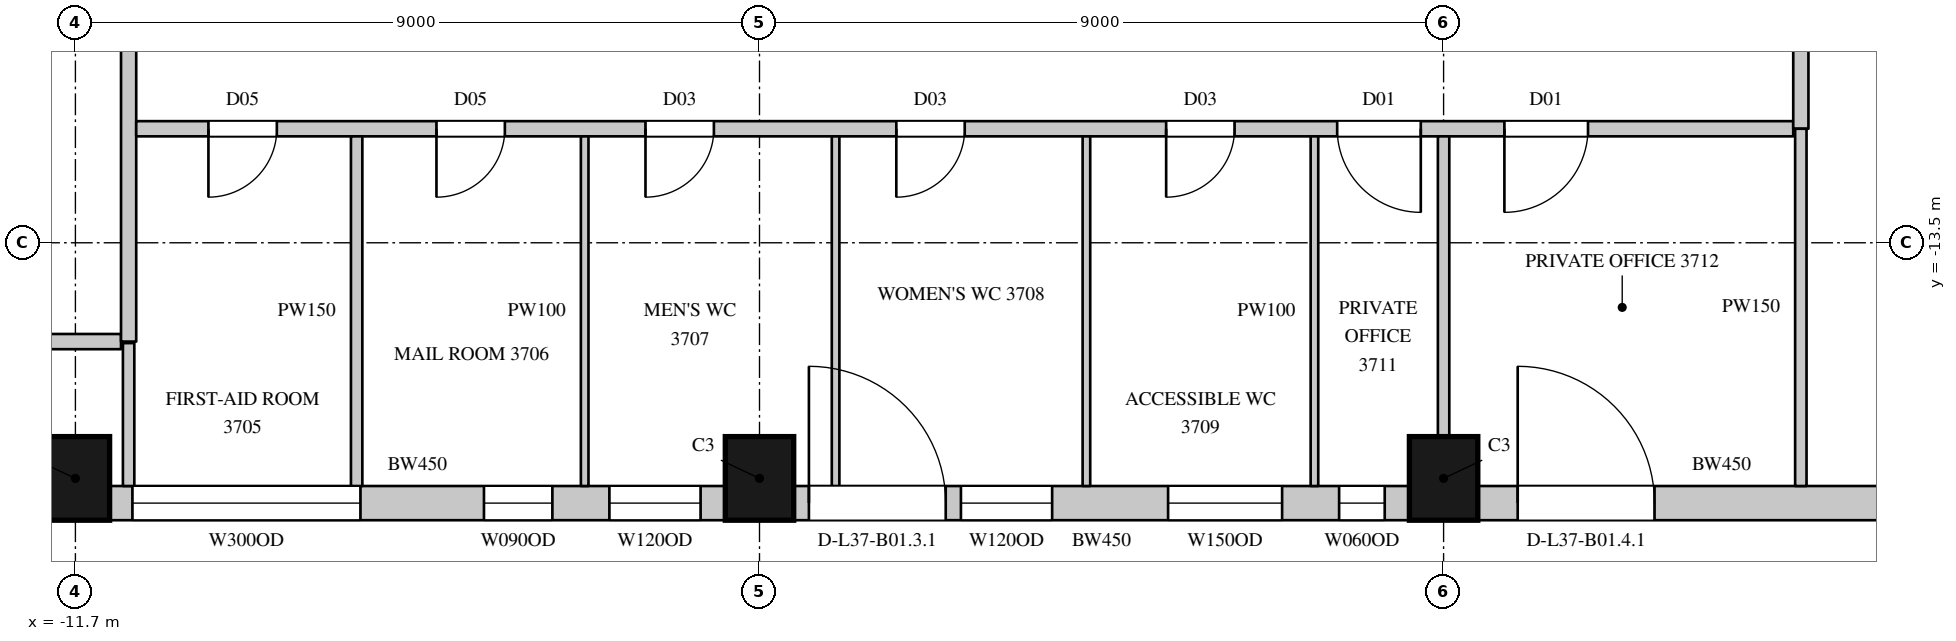
"""IFC4 building model, lengths in metres.
Left out: names, types, materials, properties, quantities, classifications, styles, units other than length and angle.
Written with IfcOpenShell. Run it as: python <this file> out.ifc"""

import sys

from ifc_helpers import new_model, si_unit, direction, frame, frame_2d, origin, origin_2d, place, context, subcontext, project, spatial, rectangle, extrude, element, fill, save


model = new_model("IFC4")
c1 = context("Model", 3, precision=1e-05, world=origin(), true_north=direction((0.0, 1.0)))
c2 = subcontext(c1, "Body", "Model", "MODEL_VIEW")
j1 = project(units=[si_unit("LENGTHUNIT", "METRE"), si_unit("PLANEANGLEUNIT", "RADIAN")], contexts=[c1])
p1 = place(None, origin())
s1 = spatial("IfcSite", under=j1, at=p1, CompositionType="ELEMENT")
p2 = place(p1, origin())
s2 = spatial("IfcBuilding", under=s1, at=p2, CompositionType="ELEMENT")
p3 = place(p2, frame((0.0, 0.0, 172.8)))
s3 = spatial("IfcBuildingStorey", under=s2, at=p3, CompositionType="ELEMENT", Elevation=172.8)
for number, where, z_axis, x_axis in (
    (1, (-11.7, -16.6, 0.0), (0.0, 0.0, 1.0), (1.0, 0.0, 0.0)),
    (2, (-2.7, -16.6, 0.0), (0.0, 0.0, 1.0), (1.0, 0.0, 0.0)),
    (3, (6.3, -16.6, 0.0), (0.0, 0.0, 1.0), (1.0, 0.0, 0.0)),
):
    element("IfcColumn", number, at=place(p3, frame(where, z_axis=z_axis, x_axis=x_axis)), inside=s3, PredefinedType="COLUMN", context=c2, shape_type="SweptSolid", body=[
        extrude(rectangle(XDim=0.9, YDim=1.1, at=origin_2d()), origin(), (0.0, 0.0, 1.0), 4.1),
    ])
p4 = place(p3, frame((-11.25, -16.925, 0.0), z_axis=(0.0, 0.0, 1.0), x_axis=(1.0, 0.0, 0.0)))
e4 = element("IfcWall", 4, at=p4, inside=s3, PredefinedType="SOLIDWALL", context=c2, shape_type="SweptSolid", body=[
    extrude(rectangle(XDim=8.1, YDim=0.45, at=frame_2d((4.05, 0.0))), origin(), (0.0, 0.0, 1.0), 3.8),
])
p5 = place(p4, frame((0.3, 0.0, 1.05)))
e5 = element("IfcOpeningElement", 5, at=p5, cuts=e4, PredefinedType="OPENING", context=c2, shape_type="SweptSolid", body=[
    extrude(rectangle(XDim=3.0, YDim=2.4, at=frame_2d((1.5, 1.2))), frame((0.0, 0.235, 0.0), z_axis=(0.0, -1.0, 0.0), x_axis=(1.0, 0.0, 0.0)), (0.0, 0.0, 1.0), 0.47),
])
p6 = place(p4, frame((4.925, 0.0, 1.05)))
e6 = element("IfcOpeningElement", 6, at=p6, cuts=e4, PredefinedType="OPENING", context=c2, shape_type="SweptSolid", body=[
    extrude(rectangle(XDim=0.9, YDim=2.4, at=frame_2d((0.45, 1.2))), frame((0.0, 0.235, 0.0), z_axis=(0.0, -1.0, 0.0), x_axis=(1.0, 0.0, 0.0)), (0.0, 0.0, 1.0), 0.47),
])
p7 = place(p4, frame((6.575, 0.0, 1.05)))
e7 = element("IfcOpeningElement", 7, at=p7, cuts=e4, PredefinedType="OPENING", context=c2, shape_type="SweptSolid", body=[
    extrude(rectangle(XDim=1.2, YDim=2.4, at=frame_2d((0.6, 1.2))), frame((0.0, 0.235, 0.0), z_axis=(0.0, -1.0, 0.0), x_axis=(1.0, 0.0, 0.0)), (0.0, 0.0, 1.0), 0.47),
])
p8 = place(p3, frame((-2.25, -16.925, 0.0), z_axis=(0.0, 0.0, 1.0), x_axis=(1.0, 0.0, 0.0)))
e8 = element("IfcWall", 8, at=p8, inside=s3, PredefinedType="SOLIDWALL", context=c2, shape_type="SweptSolid", body=[
    extrude(rectangle(XDim=8.1, YDim=0.45, at=frame_2d((4.05, 0.0))), origin(), (0.0, 0.0, 1.0), 3.8),
])
p9 = place(p8, frame((0.2, 0.0, 0.0)))
e9 = element("IfcOpeningElement", 9, at=p9, cuts=e8, PredefinedType="OPENING", context=c2, shape_type="SweptSolid", body=[
    extrude(rectangle(XDim=1.8, YDim=2.4, at=frame_2d((0.9, 1.2))), frame((0.0, 0.235, 0.0), z_axis=(0.0, -1.0, 0.0), x_axis=(1.0, 0.0, 0.0)), (0.0, 0.0, 1.0), 0.47),
])
p10 = place(p8, frame((2.2, 0.0, 1.05)))
e10 = element("IfcOpeningElement", 10, at=p10, cuts=e8, PredefinedType="OPENING", context=c2, shape_type="SweptSolid", body=[
    extrude(rectangle(XDim=1.2, YDim=2.4, at=frame_2d((0.6, 1.2))), frame((0.0, 0.235, 0.0), z_axis=(0.0, -1.0, 0.0), x_axis=(1.0, 0.0, 0.0)), (0.0, 0.0, 1.0), 0.47),
])
p11 = place(p8, frame((4.926, 0.0, 1.05)))
e11 = element("IfcOpeningElement", 11, at=p11, cuts=e8, PredefinedType="OPENING", context=c2, shape_type="SweptSolid", body=[
    extrude(rectangle(XDim=1.5, YDim=2.4, at=frame_2d((0.75, 1.2))), frame((0.0, 0.235, 0.0), z_axis=(0.0, -1.0, 0.0), x_axis=(1.0, 0.0, 0.0)), (0.0, 0.0, 1.0), 0.47),
])
p12 = place(p8, frame((7.176, 0.0, 1.05)))
e12 = element("IfcOpeningElement", 12, at=p12, cuts=e8, PredefinedType="OPENING", context=c2, shape_type="SweptSolid", body=[
    extrude(rectangle(XDim=0.6, YDim=2.4, at=frame_2d((0.3, 1.2))), frame((0.0, 0.235, 0.0), z_axis=(0.0, -1.0, 0.0), x_axis=(1.0, 0.0, 0.0)), (0.0, 0.0, 1.0), 0.47),
])
p13 = place(p3, frame((6.75, -16.925, 0.0), z_axis=(0.0, 0.0, 1.0), x_axis=(1.0, 0.0, 0.0)))
e13 = element("IfcWall", 13, at=p13, inside=s3, PredefinedType="SOLIDWALL", context=c2, shape_type="SweptSolid", body=[
    extrude(rectangle(XDim=6.414, YDim=0.45, at=frame_2d((3.207, 0.0))), origin(), (0.0, 0.0, 1.0), 3.8),
])
p14 = place(p13, frame((0.525, 0.0, 0.0)))
e14 = element("IfcOpeningElement", 14, at=p14, cuts=e13, PredefinedType="OPENING", context=c2, shape_type="SweptSolid", body=[
    extrude(rectangle(XDim=1.8, YDim=2.4, at=frame_2d((0.9, 1.2))), frame((0.0, 0.235, 0.0), z_axis=(0.0, -1.0, 0.0), x_axis=(1.0, 0.0, 0.0)), (0.0, 0.0, 1.0), 0.47),
])
p15 = place(p3, frame((-13.97, -14.8, 0.0), z_axis=(0.0, 0.0, 1.0), x_axis=(1.0, 0.0, 0.0)))
e15 = element("IfcWall", 15, at=p15, inside=s3, PredefinedType="PARTITIONING", context=c2, shape_type="SweptSolid", body=[
    extrude(rectangle(XDim=2.87, YDim=0.2, at=frame_2d((1.435, 0.0))), origin(), (0.0, 0.0, 1.0), 3.8),
])
p16 = place(p3, frame((-11.0, -14.8, 0.0), z_axis=(0.0, 0.0, 1.0), x_axis=(0.0, 1.0, 0.0)))
e16 = element("IfcWall", 16, at=p16, inside=s3, PredefinedType="PARTITIONING", context=c2, shape_type="SweptSolid", body=[
    extrude(rectangle(XDim=29.6, YDim=0.2, at=frame_2d((14.8, 0.0))), origin(), (0.0, 0.0, 1.0), 3.8),
])
p17 = place(p16, frame((14.15, 0.0, 0.0)))
e17 = element("IfcOpeningElement", 17, at=p17, cuts=e16, PredefinedType="OPENING", context=c2, shape_type="SweptSolid", body=[
    extrude(rectangle(XDim=1.5, YDim=2.4, at=frame_2d((0.75, 1.2))), frame((0.0, 0.11, 0.0), z_axis=(0.0, -1.0, 0.0), x_axis=(1.0, 0.0, 0.0)), (0.0, 0.0, 1.0), 0.22),
])
p18 = place(p3, frame((-10.9, -12.0, 0.0), z_axis=(0.0, 0.0, 1.0), x_axis=(1.0, 0.0, 0.0)))
e18 = element("IfcWall", 18, at=p18, inside=s3, PredefinedType="PARTITIONING", context=c2, shape_type="SweptSolid", body=[
    extrude(rectangle(XDim=21.8, YDim=0.2, at=frame_2d((10.9, 0.0))), origin(), (0.0, 0.0, 1.0), 3.8),
])
p19 = place(p18, frame((0.95, 0.0, 0.0)))
e19 = element("IfcOpeningElement", 19, at=p19, cuts=e18, PredefinedType="OPENING", context=c2, shape_type="SweptSolid", body=[
    extrude(rectangle(XDim=0.9, YDim=2.2, at=frame_2d((0.45, 1.1))), frame((0.0, 0.11, 0.0), z_axis=(0.0, -1.0, 0.0), x_axis=(1.0, 0.0, 0.0)), (0.0, 0.0, 1.0), 0.22),
])
p20 = place(p18, frame((3.95, 0.0, 0.0)))
e20 = element("IfcOpeningElement", 20, at=p20, cuts=e18, PredefinedType="OPENING", context=c2, shape_type="SweptSolid", body=[
    extrude(rectangle(XDim=0.9, YDim=2.2, at=frame_2d((0.45, 1.1))), frame((0.0, 0.11, 0.0), z_axis=(0.0, -1.0, 0.0), x_axis=(1.0, 0.0, 0.0)), (0.0, 0.0, 1.0), 0.22),
])
p21 = place(p18, frame((6.7, 0.0, 0.0)))
e21 = element("IfcOpeningElement", 21, at=p21, cuts=e18, PredefinedType="OPENING", context=c2, shape_type="SweptSolid", body=[
    extrude(rectangle(XDim=0.9, YDim=2.2, at=frame_2d((0.45, 1.1))), frame((0.0, 0.11, 0.0), z_axis=(0.0, -1.0, 0.0), x_axis=(1.0, 0.0, 0.0)), (0.0, 0.0, 1.0), 0.22),
])
p22 = place(p18, frame((10.0, 0.0, 0.0)))
e22 = element("IfcOpeningElement", 22, at=p22, cuts=e18, PredefinedType="OPENING", context=c2, shape_type="SweptSolid", body=[
    extrude(rectangle(XDim=0.9, YDim=2.2, at=frame_2d((0.45, 1.1))), frame((0.0, 0.11, 0.0), z_axis=(0.0, -1.0, 0.0), x_axis=(1.0, 0.0, 0.0)), (0.0, 0.0, 1.0), 0.22),
])
p23 = place(p18, frame((13.55, 0.0, 0.0)))
e23 = element("IfcOpeningElement", 23, at=p23, cuts=e18, PredefinedType="OPENING", context=c2, shape_type="SweptSolid", body=[
    extrude(rectangle(XDim=0.9, YDim=2.2, at=frame_2d((0.45, 1.1))), frame((0.0, 0.11, 0.0), z_axis=(0.0, -1.0, 0.0), x_axis=(1.0, 0.0, 0.0)), (0.0, 0.0, 1.0), 0.22),
])
p24 = place(p18, frame((15.8, 0.0, 0.0)))
e24 = element("IfcOpeningElement", 24, at=p24, cuts=e18, PredefinedType="OPENING", context=c2, shape_type="SweptSolid", body=[
    extrude(rectangle(XDim=1.1, YDim=2.4, at=frame_2d((0.55, 1.2))), frame((0.0, 0.11, 0.0), z_axis=(0.0, -1.0, 0.0), x_axis=(1.0, 0.0, 0.0)), (0.0, 0.0, 1.0), 0.22),
])
p25 = place(p18, frame((18.0, 0.0, 0.0)))
e25 = element("IfcOpeningElement", 25, at=p25, cuts=e18, PredefinedType="OPENING", context=c2, shape_type="SweptSolid", body=[
    extrude(rectangle(XDim=1.1, YDim=2.4, at=frame_2d((0.55, 1.2))), frame((0.0, 0.11, 0.0), z_axis=(0.0, -1.0, 0.0), x_axis=(1.0, 0.0, 0.0)), (0.0, 0.0, 1.0), 0.22),
])
p26 = place(p3, frame((11.0, -12.0, 0.0), z_axis=(0.0, 0.0, 1.0), x_axis=(0.0, 1.0, 0.0)))
e26 = element("IfcWall", 26, at=p26, inside=s3, PredefinedType="PARTITIONING", context=c2, shape_type="SweptSolid", body=[
    extrude(rectangle(XDim=24.1, YDim=0.2, at=frame_2d((12.05, 0.0))), origin(), (0.0, 0.0, 1.0), 3.8),
])
p27 = place(p26, frame((9.85, 0.0, 0.0)))
e27 = element("IfcOpeningElement", 27, at=p27, cuts=e26, PredefinedType="OPENING", context=c2, shape_type="SweptSolid", body=[
    extrude(rectangle(XDim=1.5, YDim=2.4, at=frame_2d((0.75, 1.2))), frame((0.0, 0.11, 0.0), z_axis=(0.0, -1.0, 0.0), x_axis=(1.0, 0.0, 0.0)), (0.0, 0.0, 1.0), 0.22),
])
p28 = place(p26, frame((3.15, 0.0, 0.0)))
e28 = element("IfcOpeningElement", 28, at=p28, cuts=e26, PredefinedType="OPENING", context=c2, shape_type="SweptSolid", body=[
    extrude(rectangle(XDim=1.1, YDim=2.4, at=frame_2d((0.55, 1.2))), frame((0.0, 0.11, 0.0), z_axis=(0.0, -1.0, 0.0), x_axis=(1.0, 0.0, 0.0)), (0.0, 0.0, 1.0), 0.22),
])
p29 = place(p3, frame((-11.0, -16.7, 0.0), z_axis=(0.0, 0.0, 1.0), x_axis=(0.0, 1.0, 0.0)))
e29 = element("IfcWall", 29, at=p29, inside=s3, PredefinedType="PARTITIONING", context=c2, shape_type="SweptSolid", body=[
    extrude(rectangle(XDim=1.88, YDim=0.15, at=frame_2d((0.94, 0.0))), origin(), (0.0, 0.0, 1.0), 3.8),
])
p30 = place(p3, frame((-8.0, -16.7, 0.0), z_axis=(0.0, 0.0, 1.0), x_axis=(0.0, 1.0, 0.0)))
e30 = element("IfcWall", 30, at=p30, inside=s3, PredefinedType="PARTITIONING", context=c2, shape_type="SweptSolid", body=[
    extrude(rectangle(XDim=4.6, YDim=0.15, at=frame_2d((2.3, 0.0))), origin(), (0.0, 0.0, 1.0), 3.8),
])
p31 = place(p3, frame((6.3, -16.05, 0.0), z_axis=(0.0, 0.0, 1.0), x_axis=(0.0, 1.0, 0.0)))
e31 = element("IfcWall", 31, at=p31, inside=s3, PredefinedType="PARTITIONING", context=c2, shape_type="SweptSolid", body=[
    extrude(rectangle(XDim=3.95, YDim=0.15, at=frame_2d((1.975, 0.0))), origin(), (0.0, 0.0, 1.0), 3.25),
])
p32 = place(p3, frame((11.0, -16.7, 0.0), z_axis=(0.0, 0.0, 1.0), x_axis=(0.0, 1.0, 0.0)))
e32 = element("IfcWall", 32, at=p32, inside=s3, PredefinedType="PARTITIONING", context=c2, shape_type="SweptSolid", body=[
    extrude(rectangle(XDim=4.7, YDim=0.15, at=frame_2d((2.35, 0.0))), origin(), (0.0, 0.0, 1.0), 3.8),
])
for number, where, z_axis, x_axis in (
    (33, (-5.0, -16.7, 0.0), (0.0, 0.0, 1.0), (0.0, 1.0, 0.0)),
    (34, (-1.699, -16.7, 0.0), (0.0, 0.0, 1.0), (0.0, 1.0, 0.0)),
):
    element("IfcWall", number, at=place(p3, frame(where, z_axis=z_axis, x_axis=x_axis)), inside=s3, PredefinedType="PARTITIONING", context=c2, shape_type="SweptSolid", body=[
        extrude(rectangle(XDim=4.6, YDim=0.1, at=frame_2d((2.3, 0.0))), origin(), (0.0, 0.0, 1.0), 3.8),
    ])
p33 = place(p3, frame((1.601, -16.7, 0.0), z_axis=(0.0, 0.0, 1.0), x_axis=(0.0, 1.0, 0.0)))
e35 = element("IfcWall", 35, at=p33, inside=s3, PredefinedType="PARTITIONING", context=c2, shape_type="SweptSolid", body=[
    extrude(rectangle(XDim=4.6, YDim=0.1, at=frame_2d((2.3, 0.0))), origin(), (0.0, 0.0, 1.0), 3.15),
])
p34 = place(p3, frame((4.601, -16.7, 0.0), z_axis=(0.0, 0.0, 1.0), x_axis=(0.0, 1.0, 0.0)))
e36 = element("IfcWall", 36, at=p34, inside=s3, PredefinedType="PARTITIONING", context=c2, shape_type="SweptSolid", body=[
    extrude(rectangle(XDim=4.6, YDim=0.1, at=frame_2d((2.3, 0.0))), origin(), (0.0, 0.0, 1.0), 3.8),
])
p35 = place(p5, origin())
e37 = element("IfcWindow", 37, at=p35, inside=s3, PartitioningType="SINGLE_PANEL", PredefinedType="WINDOW", context=c2, shape_type="SweptSolid", body=[
    extrude(rectangle(XDim=3.0, YDim=2.4, at=frame_2d((1.5, 1.2))), frame((0.0, 0.135, 0.0), z_axis=(0.0, -1.0, 0.0), x_axis=(1.0, 0.0, 0.0)), (0.0, 0.0, 1.0), 0.06),
])
fill(e5, e37)
p36 = place(p9, origin())
e38 = element("IfcDoor", 38, at=p36, inside=s3, OperationType="SLIDING_TO_LEFT", PredefinedType="DOOR", context=c2, shape_type="SweptSolid", body=[
    extrude(rectangle(XDim=1.8, YDim=2.4, at=frame_2d((0.9, 1.2))), frame((0.0, 0.13, 0.0), z_axis=(0.0, -1.0, 0.0), x_axis=(1.0, 0.0, 0.0)), (0.0, 0.0, 1.0), 0.05),
])
fill(e9, e38)
p37 = place(p10, origin())
e39 = element("IfcWindow", 39, at=p37, inside=s3, PartitioningType="SINGLE_PANEL", PredefinedType="WINDOW", context=c2, shape_type="SweptSolid", body=[
    extrude(rectangle(XDim=1.2, YDim=2.4, at=frame_2d((0.6, 1.2))), frame((0.0, 0.135, 0.0), z_axis=(0.0, -1.0, 0.0), x_axis=(1.0, 0.0, 0.0)), (0.0, 0.0, 1.0), 0.06),
])
fill(e10, e39)
p38 = place(p14, origin())
e40 = element("IfcDoor", 40, at=p38, inside=s3, OperationType="SLIDING_TO_LEFT", PredefinedType="DOOR", context=c2, shape_type="SweptSolid", body=[
    extrude(rectangle(XDim=1.8, YDim=2.4, at=frame_2d((0.9, 1.2))), frame((0.0, 0.13, 0.0), z_axis=(0.0, -1.0, 0.0), x_axis=(1.0, 0.0, 0.0)), (0.0, 0.0, 1.0), 0.05),
])
fill(e14, e40)
p39 = place(p19, origin())
e41 = element("IfcDoor", 41, at=p39, inside=s3, OperationType="SINGLE_SWING_RIGHT", PredefinedType="DOOR", context=c2, shape_type="SweptSolid", body=[
    extrude(rectangle(XDim=0.9, YDim=2.2, at=frame_2d((0.45, 1.1))), frame((0.0, 0.025, 0.0), z_axis=(0.0, -1.0, 0.0), x_axis=(1.0, 0.0, 0.0)), (0.0, 0.0, 1.0), 0.05),
])
fill(e19, e41)
p40 = place(p20, origin())
e42 = element("IfcDoor", 42, at=p40, inside=s3, OperationType="SINGLE_SWING_RIGHT", PredefinedType="DOOR", context=c2, shape_type="SweptSolid", body=[
    extrude(rectangle(XDim=0.9, YDim=2.2, at=frame_2d((0.45, 1.1))), frame((0.0, 0.025, 0.0), z_axis=(0.0, -1.0, 0.0), x_axis=(1.0, 0.0, 0.0)), (0.0, 0.0, 1.0), 0.05),
])
fill(e20, e42)
p41 = place(p21, origin())
e43 = element("IfcDoor", 43, at=p41, inside=s3, OperationType="SINGLE_SWING_RIGHT", PredefinedType="DOOR", context=c2, shape_type="SweptSolid", body=[
    extrude(rectangle(XDim=0.9, YDim=2.2, at=frame_2d((0.45, 1.1))), frame((0.0, 0.025, 0.0), z_axis=(0.0, -1.0, 0.0), x_axis=(1.0, 0.0, 0.0)), (0.0, 0.0, 1.0), 0.05),
])
fill(e21, e43)
p42 = place(p22, origin())
e44 = element("IfcDoor", 44, at=p42, inside=s3, OperationType="SINGLE_SWING_RIGHT", PredefinedType="DOOR", context=c2, shape_type="SweptSolid", body=[
    extrude(rectangle(XDim=0.9, YDim=2.2, at=frame_2d((0.45, 1.1))), frame((0.0, 0.025, 0.0), z_axis=(0.0, -1.0, 0.0), x_axis=(1.0, 0.0, 0.0)), (0.0, 0.0, 1.0), 0.05),
])
fill(e22, e44)
p43 = place(p23, origin())
e45 = element("IfcDoor", 45, at=p43, inside=s3, OperationType="SINGLE_SWING_RIGHT", PredefinedType="DOOR", context=c2, shape_type="SweptSolid", body=[
    extrude(rectangle(XDim=0.9, YDim=2.2, at=frame_2d((0.45, 1.1))), frame((0.0, 0.025, 0.0), z_axis=(0.0, -1.0, 0.0), x_axis=(1.0, 0.0, 0.0)), (0.0, 0.0, 1.0), 0.05),
])
fill(e23, e45)
p44 = place(p24, origin())
e46 = element("IfcDoor", 46, at=p44, inside=s3, OperationType="SINGLE_SWING_LEFT", PredefinedType="DOOR", context=c2, shape_type="SweptSolid", body=[
    extrude(rectangle(XDim=1.1, YDim=2.4, at=frame_2d((0.55, 1.2))), frame((0.0, 0.025, 0.0), z_axis=(0.0, -1.0, 0.0), x_axis=(1.0, 0.0, 0.0)), (0.0, 0.0, 1.0), 0.05),
])
fill(e24, e46)
p45 = place(p25, origin())
e47 = element("IfcDoor", 47, at=p45, inside=s3, OperationType="SINGLE_SWING_RIGHT", PredefinedType="DOOR", context=c2, shape_type="SweptSolid", body=[
    extrude(rectangle(XDim=1.1, YDim=2.4, at=frame_2d((0.55, 1.2))), frame((0.0, 0.025, 0.0), z_axis=(0.0, -1.0, 0.0), x_axis=(1.0, 0.0, 0.0)), (0.0, 0.0, 1.0), 0.05),
])
fill(e25, e47)
p46 = place(p6, origin())
e48 = element("IfcWindow", 48, at=p46, inside=s3, PartitioningType="SINGLE_PANEL", PredefinedType="WINDOW", context=c2, shape_type="SweptSolid", body=[
    extrude(rectangle(XDim=0.9, YDim=2.4, at=frame_2d((0.45, 1.2))), frame((0.0, 0.135, 0.0), z_axis=(0.0, -1.0, 0.0), x_axis=(1.0, 0.0, 0.0)), (0.0, 0.0, 1.0), 0.06),
])
fill(e6, e48)
p47 = place(p7, origin())
e49 = element("IfcWindow", 49, at=p47, inside=s3, PartitioningType="SINGLE_PANEL", PredefinedType="WINDOW", context=c2, shape_type="SweptSolid", body=[
    extrude(rectangle(XDim=1.2, YDim=2.4, at=frame_2d((0.6, 1.2))), frame((0.0, 0.135, 0.0), z_axis=(0.0, -1.0, 0.0), x_axis=(1.0, 0.0, 0.0)), (0.0, 0.0, 1.0), 0.06),
])
fill(e7, e49)
p48 = place(p11, origin())
e50 = element("IfcWindow", 50, at=p48, inside=s3, PartitioningType="SINGLE_PANEL", PredefinedType="WINDOW", context=c2, shape_type="SweptSolid", body=[
    extrude(rectangle(XDim=1.5, YDim=2.4, at=frame_2d((0.75, 1.2))), frame((0.0, 0.135, 0.0), z_axis=(0.0, -1.0, 0.0), x_axis=(1.0, 0.0, 0.0)), (0.0, 0.0, 1.0), 0.06),
])
fill(e11, e50)
p49 = place(p12, origin())
e51 = element("IfcWindow", 51, at=p49, inside=s3, PartitioningType="SINGLE_PANEL", PredefinedType="WINDOW", context=c2, shape_type="SweptSolid", body=[
    extrude(rectangle(XDim=0.6, YDim=2.4, at=frame_2d((0.3, 1.2))), frame((0.0, 0.135, 0.0), z_axis=(0.0, -1.0, 0.0), x_axis=(1.0, 0.0, 0.0)), (0.0, 0.0, 1.0), 0.06),
])
fill(e12, e51)
save(model, sys.argv[1])
